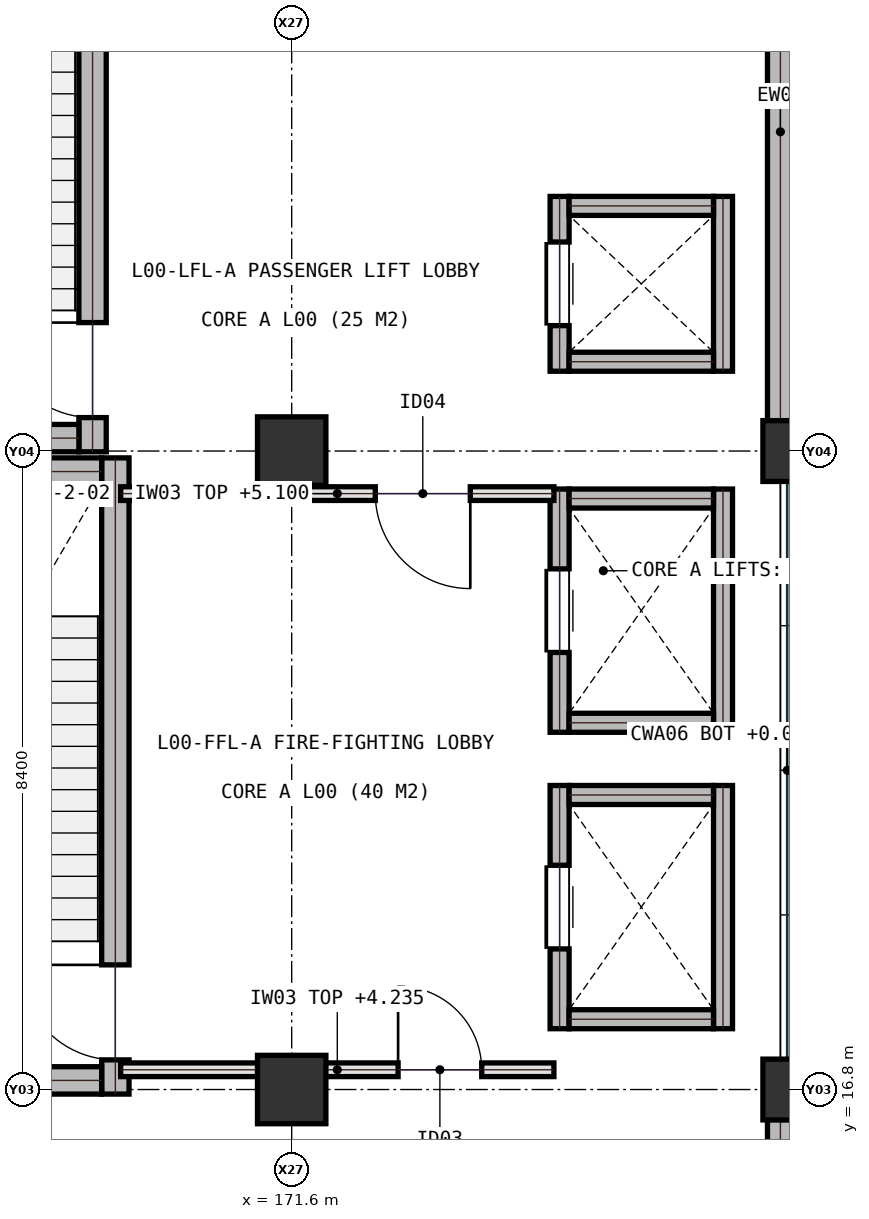
"""IFC4 building model, lengths in metres.
Left out: names, types, materials, properties, quantities, classifications, styles, units other than length and angle.
Written with IfcOpenShell. Run it as: python <this file> out.ifc"""

import sys

from ifc_helpers import new_model, si_unit, direction, frame, frame_2d, origin, origin_2d, place, context, subcontext, project, spatial, rectangle, extrude, element, fill, save


model = new_model("IFC4")
c1 = context("Model", 3, precision=1e-05, world=origin(), true_north=direction((0.0, 1.0)))
c2 = subcontext(c1, "Body", "Model", "MODEL_VIEW")
j1 = project(units=[si_unit("LENGTHUNIT", "METRE"), si_unit("PLANEANGLEUNIT", "RADIAN")], contexts=[c1])
p1 = place(None, origin())
s1 = spatial("IfcSite", under=j1, at=p1, CompositionType="ELEMENT")
p2 = place(p1, origin())
s2 = spatial("IfcBuilding", under=s1, at=p2, CompositionType="ELEMENT")
p3 = place(p2, origin())
s3 = spatial("IfcBuildingStorey", under=s2, at=p3, CompositionType="ELEMENT", Elevation=0.0)
for number, where, z_axis, x_axis in (
    (1, (171.6, 16.8, 0.0), (0.0, 0.0, 1.0), (1.0, 0.0, 0.0)),
    (2, (171.6, 25.2, 0.0), (0.0, 0.0, 1.0), (1.0, 0.0, 0.0)),
):
    element("IfcColumn", number, at=place(p3, frame(where, z_axis=z_axis, x_axis=x_axis)), inside=s3, PredefinedType="COLUMN", context=c2, shape_type="SweptSolid", body=[
        extrude(rectangle(XDim=0.9, YDim=0.9, at=origin_2d()), origin(), (0.0, 0.0, 1.0), 5.4),
    ])
for number, where, z_axis, x_axis in (
    (3, (178.2, 16.8, 0.0), (0.0, 0.0, 1.0), (1.0, 0.0, 0.0)),
    (4, (178.2, 25.2, 0.0), (0.0, 0.0, 1.0), (1.0, 0.0, 0.0)),
):
    element("IfcColumn", number, at=place(p3, frame(where, z_axis=z_axis, x_axis=x_axis)), inside=s3, PredefinedType="COLUMN", context=c2, shape_type="SweptSolid", body=[
        extrude(rectangle(XDim=0.8, YDim=0.8, at=origin_2d()), origin(), (0.0, 0.0, 1.0), 5.4),
    ])
for number, where, z_axis, x_axis in (
    (5, (178.03, 8.795, 0.0), (0.0, 0.0, 1.0), (0.0, 1.0, 0.0)),
    (6, (178.03, 25.595, 0.0), (0.0, 0.0, 1.0), (0.0, 1.0, 0.0)),
):
    element("IfcWall", number, at=place(p3, frame(where, z_axis=z_axis, x_axis=x_axis)), inside=s3, PredefinedType="SHEAR", context=c2, shape_type="SweptSolid", body=[
        extrude(rectangle(XDim=7.61, YDim=0.34, at=frame_2d((3.805, 0.0))), origin(), (0.0, 0.0, 1.0), 5.1),
    ])
p4 = place(p3, frame((169.28, 16.74, 0.0), z_axis=(0.0, 0.0, 1.0), x_axis=(0.0, 1.0, 0.0)))
e7 = element("IfcWall", 7, at=p4, inside=s3, PredefinedType="SHEAR", context=c2, shape_type="SweptSolid", body=[
    extrude(rectangle(XDim=8.37, YDim=0.36, at=frame_2d((4.185, 0.0))), origin(), (0.0, 0.0, 1.0), 5.1),
])
p5 = place(p4, frame((0.45, 0.0, 0.0)))
e8 = element("IfcOpeningElement", 8, at=p5, cuts=e7, PredefinedType="OPENING", context=c2, shape_type="SweptSolid", body=[
    extrude(rectangle(XDim=1.25, YDim=2.15, at=frame_2d((0.625, 1.075))), frame((0.0, 0.19, 0.0), z_axis=(0.0, -1.0, 0.0), x_axis=(1.0, 0.0, 0.0)), (0.0, 0.0, 1.0), 0.38),
])
for number, where, z_axis, x_axis in (
    (9, (165.6, 24.93, 0.0), (0.0, 0.0, 1.0), (1.0, 0.0, 0.0)),
    (10, (165.6, 16.92, 0.0), (0.0, 0.0, 1.0), (1.0, 0.0, 0.0)),
):
    element("IfcWall", number, at=place(p3, frame(where, z_axis=z_axis, x_axis=x_axis)), inside=s3, PredefinedType="SHEAR", context=c2, shape_type="SweptSolid", body=[
        extrude(rectangle(XDim=3.5, YDim=0.36, at=frame_2d((1.75, 0.0))), origin(), (0.0, 0.0, 1.0), 5.1),
    ])
p6 = place(p3, frame((168.98, 25.19, 0.0), z_axis=(0.0, 0.0, 1.0), x_axis=(0.0, 1.0, 0.0)))
e11 = element("IfcWall", 11, at=p6, inside=s3, PredefinedType="SHEAR", context=c2, shape_type="SweptSolid", body=[
    extrude(rectangle(XDim=8.17, YDim=0.36, at=frame_2d((4.085, 0.0))), origin(), (0.0, 0.0, 1.0), 5.1),
])
p7 = place(p6, frame((0.45, 0.0, 0.0)))
e12 = element("IfcOpeningElement", 12, at=p7, cuts=e11, PredefinedType="OPENING", context=c2, shape_type="SweptSolid", body=[
    extrude(rectangle(XDim=1.25, YDim=2.15, at=frame_2d((0.625, 1.075))), frame((0.0, 0.19, 0.0), z_axis=(0.0, -1.0, 0.0), x_axis=(1.0, 0.0, 0.0)), (0.0, 0.0, 1.0), 0.38),
])
p8 = place(p3, frame((165.6, 25.37, 0.0), z_axis=(0.0, 0.0, 1.0), x_axis=(1.0, 0.0, 0.0)))
e13 = element("IfcWall", 13, at=p8, inside=s3, PredefinedType="SHEAR", context=c2, shape_type="SweptSolid", body=[
    extrude(rectangle(XDim=3.2, YDim=0.36, at=frame_2d((1.6, 0.0))), origin(), (0.0, 0.0, 1.0), 5.1),
])
p9 = place(p3, frame((175.125, 17.6, 0.0), z_axis=(0.0, 0.0, 1.0), x_axis=(0.0, 1.0, 0.0)))
e14 = element("IfcWall", 14, at=p9, inside=s3, PredefinedType="SHEAR", context=c2, shape_type="SweptSolid", body=[
    extrude(rectangle(XDim=3.2, YDim=0.25, at=frame_2d((1.6, 0.0))), origin(), (0.0, 0.0, 1.0), 5.1),
])
p10 = place(p9, frame((1.05, 0.0, 0.0)))
e15 = element("IfcOpeningElement", 15, at=p10, cuts=e14, PredefinedType="OPENING", context=c2, shape_type="SweptSolid", body=[
    extrude(rectangle(XDim=1.1, YDim=2.15, at=frame_2d((0.55, 1.075))), frame((0.0, 0.135, 0.0), z_axis=(0.0, -1.0, 0.0), x_axis=(1.0, 0.0, 0.0)), (0.0, 0.0, 1.0), 0.27),
])
p11 = place(p3, frame((177.275, 17.6, 0.0), z_axis=(0.0, 0.0, 1.0), x_axis=(0.0, 1.0, 0.0)))
e16 = element("IfcWall", 16, at=p11, inside=s3, PredefinedType="SHEAR", context=c2, shape_type="SweptSolid", body=[
    extrude(rectangle(XDim=3.2, YDim=0.25, at=frame_2d((1.6, 0.0))), origin(), (0.0, 0.0, 1.0), 5.1),
])
for number, where, z_axis, x_axis in (
    (17, (175.25, 17.725, 0.0), (0.0, 0.0, 1.0), (1.0, 0.0, 0.0)),
    (18, (175.25, 20.675, 0.0), (0.0, 0.0, 1.0), (1.0, 0.0, 0.0)),
):
    element("IfcWall", number, at=place(p3, frame(where, z_axis=z_axis, x_axis=x_axis)), inside=s3, PredefinedType="SHEAR", context=c2, shape_type="SweptSolid", body=[
        extrude(rectangle(XDim=1.9, YDim=0.25, at=frame_2d((0.95, 0.0))), origin(), (0.0, 0.0, 1.0), 5.1),
    ])
p12 = place(p3, frame((175.125, 21.5, 0.0), z_axis=(0.0, 0.0, 1.0), x_axis=(0.0, 1.0, 0.0)))
e19 = element("IfcWall", 19, at=p12, inside=s3, PredefinedType="SHEAR", context=c2, shape_type="SweptSolid", body=[
    extrude(rectangle(XDim=3.2, YDim=0.25, at=frame_2d((1.6, 0.0))), origin(), (0.0, 0.0, 1.0), 5.1),
])
p13 = place(p12, frame((1.05, 0.0, 0.0)))
e20 = element("IfcOpeningElement", 20, at=p13, cuts=e19, PredefinedType="OPENING", context=c2, shape_type="SweptSolid", body=[
    extrude(rectangle(XDim=1.1, YDim=2.15, at=frame_2d((0.55, 1.075))), frame((0.0, 0.135, 0.0), z_axis=(0.0, -1.0, 0.0), x_axis=(1.0, 0.0, 0.0)), (0.0, 0.0, 1.0), 0.27),
])
p14 = place(p3, frame((177.275, 21.5, 0.0), z_axis=(0.0, 0.0, 1.0), x_axis=(0.0, 1.0, 0.0)))
e21 = element("IfcWall", 21, at=p14, inside=s3, PredefinedType="SHEAR", context=c2, shape_type="SweptSolid", body=[
    extrude(rectangle(XDim=3.2, YDim=0.25, at=frame_2d((1.6, 0.0))), origin(), (0.0, 0.0, 1.0), 5.1),
])
for number, where, z_axis, x_axis in (
    (22, (175.25, 21.625, 0.0), (0.0, 0.0, 1.0), (1.0, 0.0, 0.0)),
    (23, (175.25, 24.575, 0.0), (0.0, 0.0, 1.0), (1.0, 0.0, 0.0)),
):
    element("IfcWall", number, at=place(p3, frame(where, z_axis=z_axis, x_axis=x_axis)), inside=s3, PredefinedType="SHEAR", context=c2, shape_type="SweptSolid", body=[
        extrude(rectangle(XDim=1.9, YDim=0.25, at=frame_2d((0.95, 0.0))), origin(), (0.0, 0.0, 1.0), 5.1),
    ])
p15 = place(p3, frame((175.125, 26.25, 0.0), z_axis=(0.0, 0.0, 1.0), x_axis=(0.0, 1.0, 0.0)))
e24 = element("IfcWall", 24, at=p15, inside=s3, PredefinedType="SHEAR", context=c2, shape_type="SweptSolid", body=[
    extrude(rectangle(XDim=2.3, YDim=0.25, at=frame_2d((1.15, 0.0))), origin(), (0.0, 0.0, 1.0), 5.1),
])
p16 = place(p15, frame((0.6, 0.0, 0.0)))
e25 = element("IfcOpeningElement", 25, at=p16, cuts=e24, PredefinedType="OPENING", context=c2, shape_type="SweptSolid", body=[
    extrude(rectangle(XDim=1.1, YDim=2.15, at=frame_2d((0.55, 1.075))), frame((0.0, 0.135, 0.0), z_axis=(0.0, -1.0, 0.0), x_axis=(1.0, 0.0, 0.0)), (0.0, 0.0, 1.0), 0.27),
])
p17 = place(p3, frame((177.275, 26.25, 0.0), z_axis=(0.0, 0.0, 1.0), x_axis=(0.0, 1.0, 0.0)))
e26 = element("IfcWall", 26, at=p17, inside=s3, PredefinedType="SHEAR", context=c2, shape_type="SweptSolid", body=[
    extrude(rectangle(XDim=2.3, YDim=0.25, at=frame_2d((1.15, 0.0))), origin(), (0.0, 0.0, 1.0), 5.1),
])
for number, where, z_axis, x_axis in (
    (27, (175.25, 26.375, 0.0), (0.0, 0.0, 1.0), (1.0, 0.0, 0.0)),
    (28, (175.25, 28.425, 0.0), (0.0, 0.0, 1.0), (1.0, 0.0, 0.0)),
):
    element("IfcWall", number, at=place(p3, frame(where, z_axis=z_axis, x_axis=x_axis)), inside=s3, PredefinedType="SHEAR", context=c2, shape_type="SweptSolid", body=[
        extrude(rectangle(XDim=1.9, YDim=0.25, at=frame_2d((0.95, 0.0))), origin(), (0.0, 0.0, 1.0), 5.1),
    ])
p18 = place(p3, frame((169.35, 24.64, 0.0), z_axis=(0.0, 0.0, 1.0), x_axis=(1.0, 0.0, 0.0)))
e29 = element("IfcWall", 29, at=p18, inside=s3, PredefinedType="SOLIDWALL", context=c2, shape_type="SweptSolid", body=[
    extrude(rectangle(XDim=5.7, YDim=0.18, at=frame_2d((2.85, 0.0))), origin(), (0.0, 0.0, 1.0), 5.1),
])
p19 = place(p18, frame((3.35, 0.0, 0.0)))
e30 = element("IfcOpeningElement", 30, at=p19, cuts=e29, PredefinedType="OPENING", context=c2, shape_type="SweptSolid", body=[
    extrude(rectangle(XDim=1.25, YDim=2.15, at=frame_2d((0.625, 1.075))), frame((0.0, 0.1, 0.0), z_axis=(0.0, -1.0, 0.0), x_axis=(1.0, 0.0, 0.0)), (0.0, 0.0, 1.0), 0.2),
])
p20 = place(p3, frame((169.35, 17.06, 0.0), z_axis=(0.0, 0.0, 1.0), x_axis=(1.0, 0.0, 0.0)))
e31 = element("IfcWall", 31, at=p20, inside=s3, PredefinedType="SOLIDWALL", context=c2, shape_type="SweptSolid", body=[
    extrude(rectangle(XDim=5.7, YDim=0.18, at=frame_2d((2.85, 0.0))), origin(), (0.0, 0.0, 1.0), 4.235),
])
p21 = place(p20, frame((3.65, 0.0, 0.0)))
e32 = element("IfcOpeningElement", 32, at=p21, cuts=e31, PredefinedType="OPENING", context=c2, shape_type="SweptSolid", body=[
    extrude(rectangle(XDim=1.1, YDim=2.15, at=frame_2d((0.55, 1.075))), frame((0.0, 0.1, 0.0), z_axis=(0.0, -1.0, 0.0), x_axis=(1.0, 0.0, 0.0)), (0.0, 0.0, 1.0), 0.2),
])
p22 = place(p5, origin())
e33 = element("IfcDoor", 33, at=p22, inside=s3, OperationType="SINGLE_SWING_RIGHT", PredefinedType="DOOR", context=c2, shape_type="SweptSolid", body=[
    extrude(rectangle(XDim=1.25, YDim=2.15, at=frame_2d((0.625, 1.075))), frame((0.0, 0.025, 0.0), z_axis=(0.0, -1.0, 0.0), x_axis=(1.0, 0.0, 0.0)), (0.0, 0.0, 1.0), 0.05),
])
fill(e8, e33)
p23 = place(p7, origin())
e34 = element("IfcDoor", 34, at=p23, inside=s3, OperationType="SINGLE_SWING_RIGHT", PredefinedType="DOOR", context=c2, shape_type="SweptSolid", body=[
    extrude(rectangle(XDim=1.25, YDim=2.15, at=frame_2d((0.625, 1.075))), frame((0.0, 0.025, 0.0), z_axis=(0.0, -1.0, 0.0), x_axis=(1.0, 0.0, 0.0)), (0.0, 0.0, 1.0), 0.05),
])
fill(e12, e34)
p24 = place(p10, origin())
e35 = element("IfcDoor", 35, at=p24, inside=s3, OperationType="SLIDING_TO_LEFT", PredefinedType="DOOR", context=c2, shape_type="SweptSolid", body=[
    extrude(rectangle(XDim=1.1, YDim=2.15, at=frame_2d((0.55, 1.075))), frame((0.0, 0.025, 0.0), z_axis=(0.0, -1.0, 0.0), x_axis=(1.0, 0.0, 0.0)), (0.0, 0.0, 1.0), 0.05),
])
fill(e15, e35)
p25 = place(p13, origin())
e36 = element("IfcDoor", 36, at=p25, inside=s3, OperationType="SLIDING_TO_LEFT", PredefinedType="DOOR", context=c2, shape_type="SweptSolid", body=[
    extrude(rectangle(XDim=1.1, YDim=2.15, at=frame_2d((0.55, 1.075))), frame((0.0, 0.025, 0.0), z_axis=(0.0, -1.0, 0.0), x_axis=(1.0, 0.0, 0.0)), (0.0, 0.0, 1.0), 0.05),
])
fill(e20, e36)
p26 = place(p16, origin())
e37 = element("IfcDoor", 37, at=p26, inside=s3, OperationType="SLIDING_TO_LEFT", PredefinedType="DOOR", context=c2, shape_type="SweptSolid", body=[
    extrude(rectangle(XDim=1.1, YDim=2.15, at=frame_2d((0.55, 1.075))), frame((0.0, 0.025, 0.0), z_axis=(0.0, -1.0, 0.0), x_axis=(1.0, 0.0, 0.0)), (0.0, 0.0, 1.0), 0.05),
])
fill(e25, e37)
p27 = place(p19, frame((1.25, 0.0, 0.0), z_axis=(0.0, 0.0, 1.0), x_axis=(-1.0, 0.0, 0.0)))
e38 = element("IfcDoor", 38, at=p27, inside=s3, OperationType="SINGLE_SWING_RIGHT", PredefinedType="DOOR", context=c2, shape_type="SweptSolid", body=[
    extrude(rectangle(XDim=1.25, YDim=2.15, at=frame_2d((0.625, 1.075))), frame((0.0, 0.025, 0.0), z_axis=(0.0, -1.0, 0.0), x_axis=(1.0, 0.0, 0.0)), (0.0, 0.0, 1.0), 0.05),
])
fill(e30, e38)
p28 = place(p21, origin())
e39 = element("IfcDoor", 39, at=p28, inside=s3, OperationType="SINGLE_SWING_LEFT", PredefinedType="DOOR", context=c2, shape_type="SweptSolid", body=[
    extrude(rectangle(XDim=1.1, YDim=2.15, at=frame_2d((0.55, 1.075))), frame((0.0, 0.025, 0.0), z_axis=(0.0, -1.0, 0.0), x_axis=(1.0, 0.0, 0.0)), (0.0, 0.0, 1.0), 0.05),
])
fill(e32, e39)
save(model, sys.argv[1])
